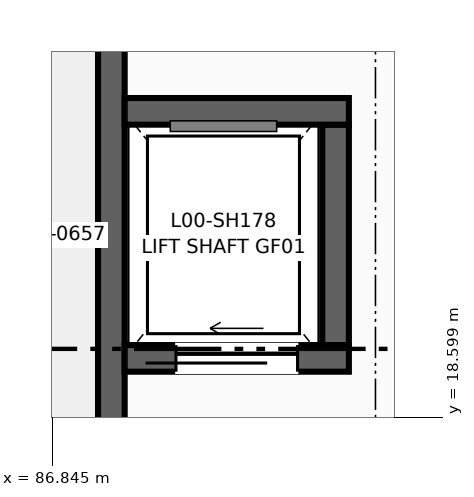
"""IFC4 building model, lengths in metres.
Left out: names, types, materials, properties, quantities, classifications, styles, units other than length and angle.
Written with IfcOpenShell. Run it as: python <this file> out.ifc"""

import sys

from ifc_helpers import new_model, si_unit, direction, frame, frame_2d, origin, place, context, subcontext, project, spatial, rectangle, extrude, element, fill, save


model = new_model("IFC4")
c1 = context("Model", 3, precision=1e-05, world=origin(), true_north=direction((0.0, 1.0)))
c2 = subcontext(c1, "Body", "Model", "MODEL_VIEW")
j1 = project(units=[si_unit("LENGTHUNIT", "METRE"), si_unit("PLANEANGLEUNIT", "RADIAN")], contexts=[c1])
p1 = place(None, origin())
s1 = spatial("IfcSite", under=j1, at=p1, CompositionType="ELEMENT")
p2 = place(p1, origin())
s2 = spatial("IfcBuilding", under=s1, at=p2, CompositionType="ELEMENT")
p3 = place(p2, origin())
s3 = spatial("IfcBuildingStorey", under=s2, at=p3, CompositionType="ELEMENT", Elevation=0.0)
p4 = place(p3, frame((87.625, 18.5, 0.0), z_axis=(0.0, 0.0, 1.0), x_axis=(0.0, 1.0, 0.0)))
e1 = element("IfcWall", 1, at=p4, inside=s3, PredefinedType="SHEAR", context=c2, shape_type="SweptSolid", body=[
    extrude(rectangle(XDim=5.0, YDim=0.35, at=frame_2d((2.5, 0.0))), origin(), (0.0, 0.0, 1.0), 4.25),
])
p5 = place(p3, frame((90.575, 19.55, 0.0), z_axis=(0.0, 0.0, 1.0), x_axis=(0.0, 1.0, 0.0)))
e2 = element("IfcWall", 2, at=p5, inside=s3, PredefinedType="SHEAR", context=c2, shape_type="SweptSolid", body=[
    extrude(rectangle(XDim=2.9, YDim=0.35, at=frame_2d((1.45, 0.0))), origin(), (0.0, 0.0, 1.0), 4.25),
])
p6 = place(p3, frame((87.8, 19.375, 0.0), z_axis=(0.0, 0.0, 1.0), x_axis=(1.0, 0.0, 0.0)))
e3 = element("IfcWall", 3, at=p6, inside=s3, PredefinedType="SHEAR", context=c2, shape_type="SweptSolid", body=[
    extrude(rectangle(XDim=2.95, YDim=0.35, at=frame_2d((1.475, 0.0))), origin(), (0.0, 0.0, 1.0), 4.25),
])
p7 = place(p6, frame((0.675, 0.0, 0.0)))
e4 = element("IfcOpeningElement", 4, at=p7, cuts=e3, PredefinedType="OPENING", context=c2, shape_type="SweptSolid", body=[
    extrude(rectangle(XDim=1.6, YDim=2.35, at=frame_2d((0.8, 1.175))), frame((0.0, 0.185, 0.0), z_axis=(0.0, -1.0, 0.0), x_axis=(1.0, 0.0, 0.0)), (0.0, 0.0, 1.0), 0.37),
])
p8 = place(p3, frame((87.8, 22.625, 0.0), z_axis=(0.0, 0.0, 1.0), x_axis=(1.0, 0.0, 0.0)))
e5 = element("IfcWall", 5, at=p8, inside=s3, PredefinedType="SHEAR", context=c2, shape_type="SweptSolid", body=[
    extrude(rectangle(XDim=2.95, YDim=0.35, at=frame_2d((1.475, 0.0))), origin(), (0.0, 0.0, 1.0), 4.25),
])
p9 = place(p7, origin())
e6 = element("IfcDoor", 6, at=p9, inside=s3, OperationType="SLIDING_TO_LEFT", PredefinedType="DOOR", context=c2, shape_type="SweptSolid", body=[
    extrude(rectangle(XDim=1.6, YDim=2.35, at=frame_2d((0.8, 1.175))), frame((0.0, 0.025, 0.0), z_axis=(0.0, -1.0, 0.0), x_axis=(1.0, 0.0, 0.0)), (0.0, 0.0, 1.0), 0.05),
])
fill(e4, e6)
save(model, sys.argv[1])
